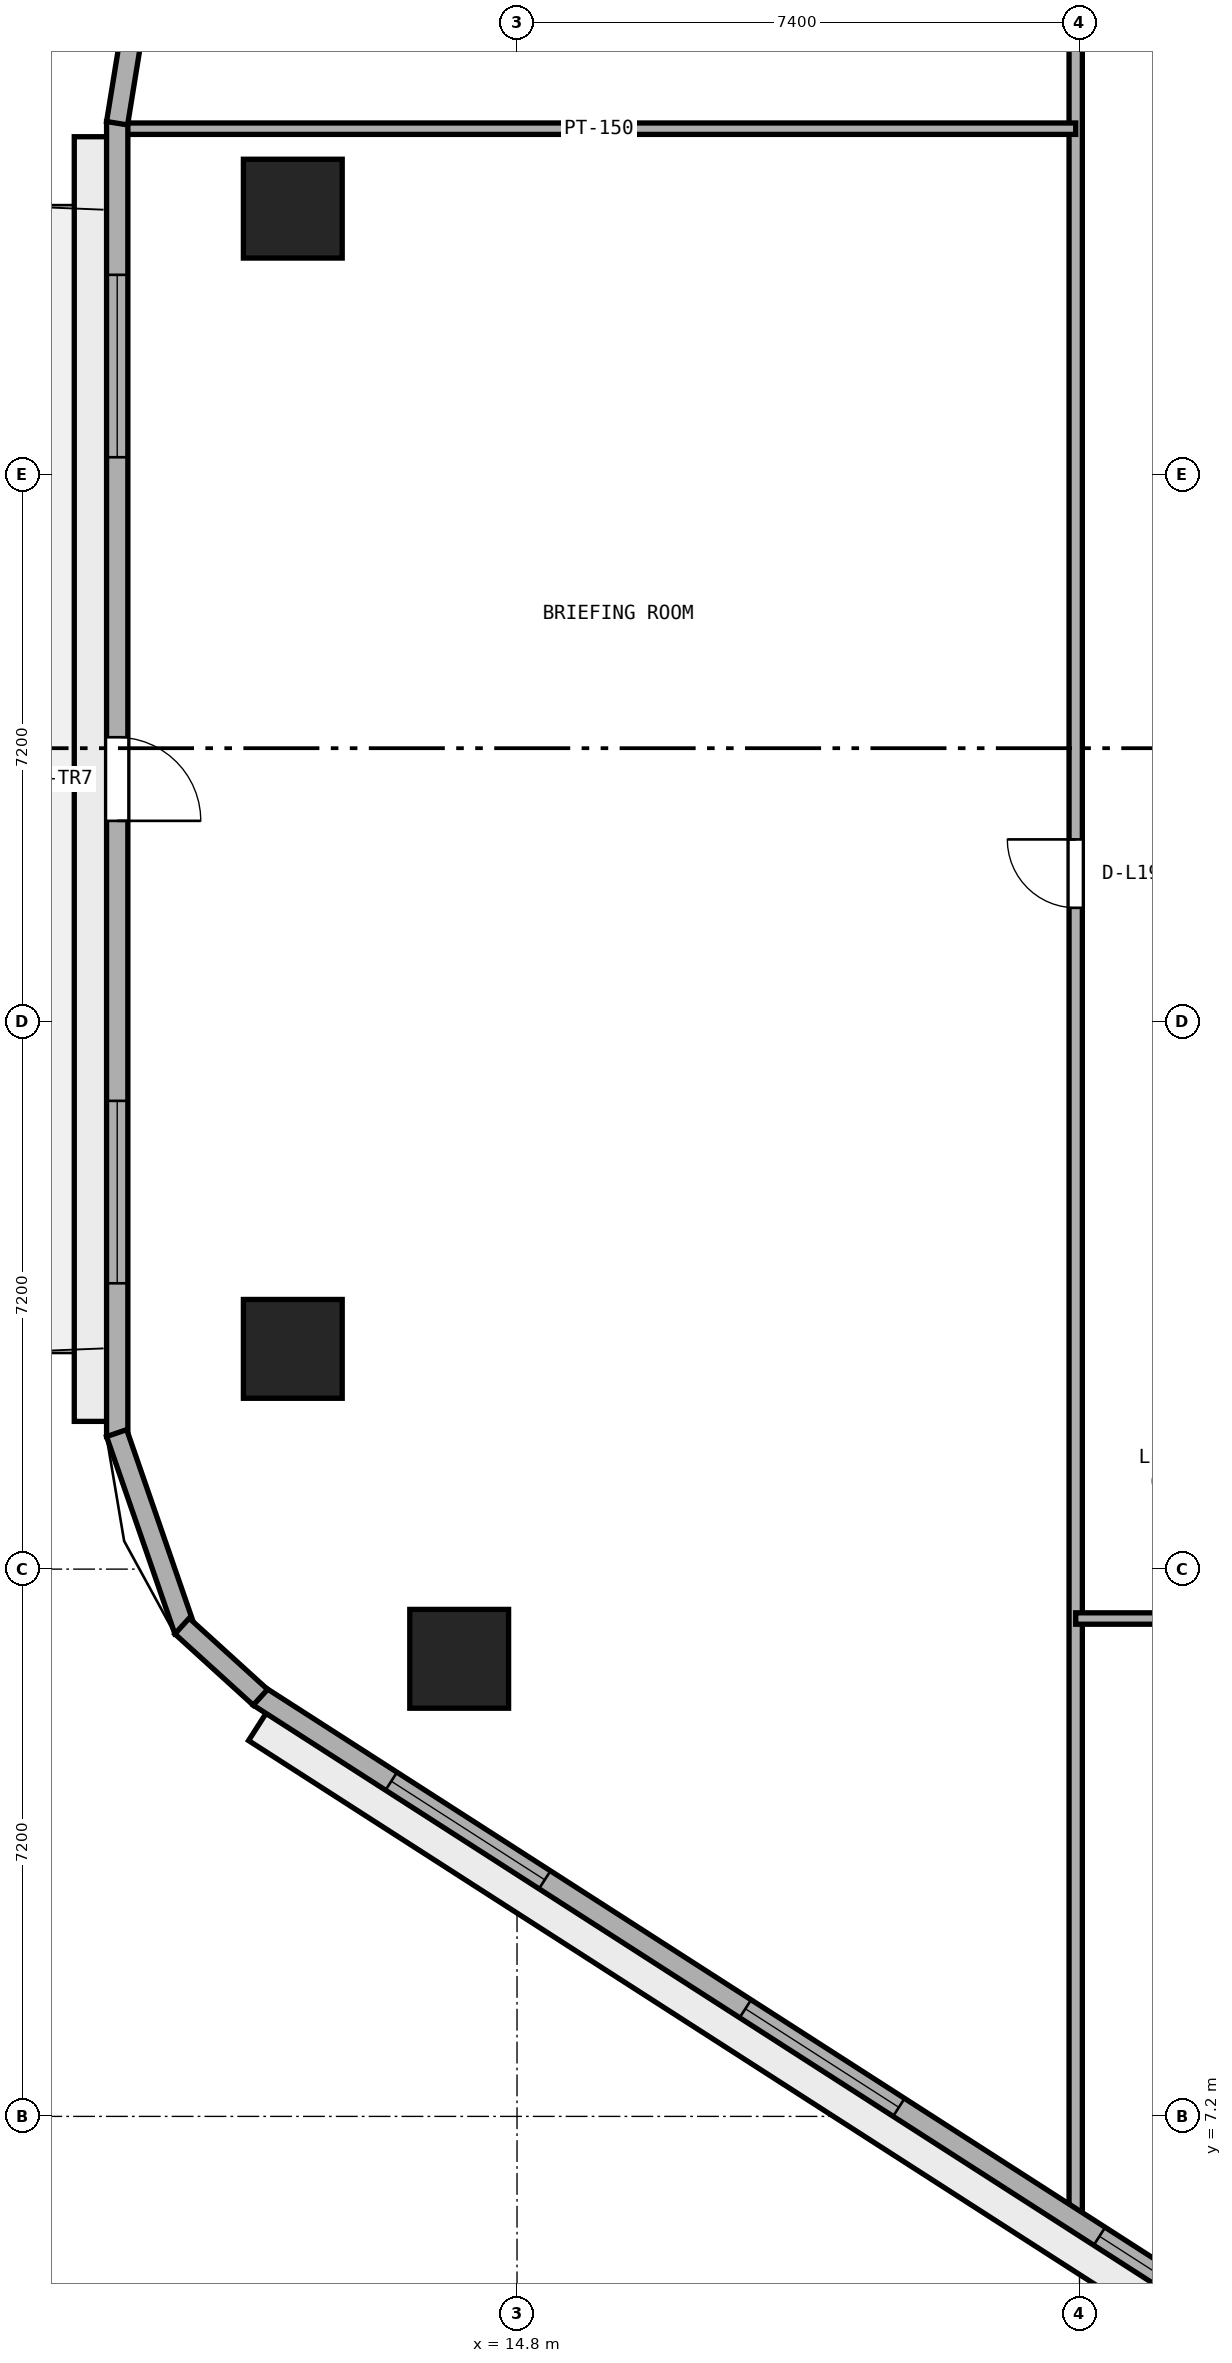
"""IFC4 building model, lengths in metres.
Left out: names, types, materials, properties, quantities, classifications, styles, units other than length and angle.
Written with IfcOpenShell. Run it as: python <this file> out.ifc"""

import sys

from ifc_helpers import new_model, si_unit, direction, frame, frame_2d, origin, origin_2d, place, context, subcontext, project, spatial, rectangle, extrude, element, fill, save


model = new_model("IFC4")
c1 = context("Model", 3, precision=1e-05, world=origin(), true_north=direction((0.0, 1.0)))
c2 = subcontext(c1, "Body", "Model", "MODEL_VIEW")
j1 = project(units=[si_unit("LENGTHUNIT", "METRE"), si_unit("PLANEANGLEUNIT", "RADIAN")], contexts=[c1])
p1 = place(None, origin())
s1 = spatial("IfcSite", under=j1, at=p1, CompositionType="ELEMENT")
p2 = place(p1, origin())
s2 = spatial("IfcBuilding", under=s1, at=p2, CompositionType="ELEMENT")
p3 = place(p2, frame((0.0, 0.0, 78.2)))
s3 = spatial("IfcBuildingStorey", under=s2, at=p3, CompositionType="ELEMENT", Elevation=78.2)
for number, where, z_axis, x_axis in (
    (1, (11.85, 32.298, 0.0), (0.0, 0.0, 1.0), (1.0, 0.0, 0.0)),
    (2, (11.85, 17.298, 0.0), (0.0, 0.0, 1.0), (1.0, 0.0, 0.0)),
    (3, (14.039, 13.22, 0.0), (0.0, 0.0, 1.0), (1.0, 0.0, 0.0)),
):
    element("IfcColumn", number, at=place(p3, frame(where, z_axis=z_axis, x_axis=x_axis)), inside=s3, PredefinedType="COLUMN", context=c2, shape_type="SweptSolid", body=[
        extrude(rectangle(XDim=1.3, YDim=1.3, at=origin_2d()), origin(), (0.0, 0.0, 1.0), 3.8),
    ])
p4 = place(p3, frame((22.15, 5.798, 0.0), z_axis=(0.0, 0.0, 1.0), x_axis=(0.0, 1.0, 0.0)))
e4 = element("IfcWall", 4, at=p4, inside=s3, PredefinedType="PARTITIONING", context=c2, shape_type="SweptSolid", body=[
    extrude(rectangle(XDim=30.852, YDim=0.175, at=frame_2d((15.426, 0.0))), origin(), (0.0, 0.0, 1.0), 3.525),
])
p5 = place(p4, frame((17.302, 0.0, 0.0)))
e5 = element("IfcOpeningElement", 5, at=p5, cuts=e4, PredefinedType="OPENING", context=c2, shape_type="SweptSolid", body=[
    extrude(rectangle(XDim=0.9, YDim=2.1, at=frame_2d((0.45, 1.05))), frame((0.0, 0.097, 0.0), z_axis=(0.0, -1.0, 0.0), x_axis=(1.0, 0.0, 0.0)), (0.0, 0.0, 1.0), 0.195),
])
p6 = place(p3, frame((22.15, 13.75, 0.0), z_axis=(0.0, 0.0, 1.0), x_axis=(1.0, 0.0, 0.0)))
e6 = element("IfcWall", 6, at=p6, inside=s3, PredefinedType="PARTITIONING", context=c2, shape_type="SweptSolid", body=[
    extrude(rectangle(XDim=29.7, YDim=0.15, at=frame_2d((14.85, 0.0))), origin(), (0.0, 0.0, 1.0), 3.525),
])
p7 = place(p6, frame((4.145, 0.0, 0.0)))
e7 = element("IfcOpeningElement", 7, at=p7, cuts=e6, PredefinedType="OPENING", context=c2, shape_type="SweptSolid", body=[
    extrude(rectangle(XDim=1.0, YDim=2.12, at=frame_2d((0.5, 1.06))), frame((0.0, 0.085, 0.0), z_axis=(0.0, -1.0, 0.0), x_axis=(1.0, 0.0, 0.0)), (0.0, 0.0, 1.0), 0.17),
])
p8 = place(p6, frame((18.755, 0.0, 0.0)))
e8 = element("IfcOpeningElement", 8, at=p8, cuts=e6, PredefinedType="OPENING", context=c2, shape_type="SweptSolid", body=[
    extrude(rectangle(XDim=1.0, YDim=2.12, at=frame_2d((0.5, 1.06))), frame((0.0, 0.085, 0.0), z_axis=(0.0, -1.0, 0.0), x_axis=(1.0, 0.0, 0.0)), (0.0, 0.0, 1.0), 0.17),
])
p9 = place(p3, frame((9.605, 33.35, 0.0), z_axis=(0.0, 0.0, 1.0), x_axis=(1.0, 0.0, 0.0)))
e9 = element("IfcWall", 9, at=p9, inside=s3, PredefinedType="PARTITIONING", context=c2, shape_type="SweptSolid", body=[
    extrude(rectangle(XDim=12.545, YDim=0.15, at=frame_2d((6.272, 0.0))), origin(), (0.0, 0.0, 1.0), 3.525),
])
p10 = place(p3, frame((9.54, 33.444, 0.0), z_axis=(0.0, 0.0, 1.0), x_axis=(0.0, -1.0, 0.0)))
e10 = element("IfcWall", 10, at=p10, inside=s3, PredefinedType="STANDARD", context=c2, shape_type="SweptSolid", body=[
    extrude(rectangle(XDim=17.301, YDim=0.28, at=frame_2d((8.65, 0.0))), origin(), (0.0, 0.0, 1.0), 3.525),
])
p11 = place(p10, frame((8.1, 0.0, 0.0)))
e11 = element("IfcOpeningElement", 11, at=p11, cuts=e10, PredefinedType="OPENING", context=c2, shape_type="SweptSolid", body=[
    extrude(rectangle(XDim=1.1, YDim=2.2, at=frame_2d((0.55, 1.1))), frame((0.0, 0.15, 0.0), z_axis=(0.0, -1.0, 0.0), x_axis=(1.0, 0.0, 0.0)), (0.0, 0.0, 1.0), 0.3),
])
p12 = place(p10, frame((2.017, 0.0, 0.9)))
e12 = element("IfcOpeningElement", 12, at=p12, cuts=e10, PredefinedType="OPENING", context=c2, shape_type="SweptSolid", body=[
    extrude(rectangle(XDim=2.4, YDim=1.75, at=frame_2d((1.2, 0.875))), frame((0.0, 0.15, 0.0), z_axis=(0.0, -1.0, 0.0), x_axis=(1.0, 0.0, 0.0)), (0.0, 0.0, 1.0), 0.3),
])
p13 = place(p10, frame((12.884, 0.0, 0.9)))
e13 = element("IfcOpeningElement", 13, at=p13, cuts=e10, PredefinedType="OPENING", context=c2, shape_type="SweptSolid", body=[
    extrude(rectangle(XDim=2.4, YDim=1.75, at=frame_2d((1.2, 0.875))), frame((0.0, 0.15, 0.0), z_axis=(0.0, -1.0, 0.0), x_axis=(1.0, 0.0, 0.0)), (0.0, 0.0, 1.0), 0.3),
])
p14 = place(p3, frame((11.405, 12.728, 0.0), z_axis=(0.0, 0.0, 1.0), x_axis=(0.841304564637, -0.540561402175, 0.0)))
e14 = element("IfcWall", 14, at=p14, inside=s3, PredefinedType="STANDARD", context=c2, shape_type="SweptSolid", body=[
    extrude(rectangle(XDim=17.612, YDim=0.28, at=frame_2d((8.806, 0.0))), origin(), (0.0, 0.0, 1.0), 3.525),
])
p15 = place(p14, frame((2.069, 0.0, 0.9)))
e15 = element("IfcOpeningElement", 15, at=p15, cuts=e14, PredefinedType="OPENING", context=c2, shape_type="SweptSolid", body=[
    extrude(rectangle(XDim=2.4, YDim=1.75, at=frame_2d((1.2, 0.875))), frame((0.0, 0.15, 0.0), z_axis=(0.0, -1.0, 0.0), x_axis=(1.0, 0.0, 0.0)), (0.0, 0.0, 1.0), 0.3),
])
p16 = place(p14, frame((7.606, 0.0, 0.9)))
e16 = element("IfcOpeningElement", 16, at=p16, cuts=e14, PredefinedType="OPENING", context=c2, shape_type="SweptSolid", body=[
    extrude(rectangle(XDim=2.4, YDim=1.75, at=frame_2d((1.2, 0.875))), frame((0.0, 0.15, 0.0), z_axis=(0.0, -1.0, 0.0), x_axis=(1.0, 0.0, 0.0)), (0.0, 0.0, 1.0), 0.3),
])
p17 = place(p14, frame((13.143, 0.0, 0.9)))
e17 = element("IfcOpeningElement", 17, at=p17, cuts=e14, PredefinedType="OPENING", context=c2, shape_type="SweptSolid", body=[
    extrude(rectangle(XDim=2.4, YDim=1.75, at=frame_2d((1.2, 0.875))), frame((0.0, 0.15, 0.0), z_axis=(0.0, -1.0, 0.0), x_axis=(1.0, 0.0, 0.0)), (0.0, 0.0, 1.0), 0.3),
])
p18 = place(p3, frame((9.753, 34.749, 0.0), z_axis=(0.0, 0.0, 1.0), x_axis=(-0.160037671962, -0.987110907423, 0.0)))
e18 = element("IfcWall", 18, at=p18, inside=s3, PredefinedType="STANDARD", context=c2, shape_type="SweptSolid", body=[
    extrude(rectangle(XDim=1.344, YDim=0.28, at=frame_2d((0.672, 0.0))), origin(), (0.0, 0.0, 1.0), 3.525),
])
p19 = place(p3, frame((9.532, 16.189, 0.0), z_axis=(0.0, 0.0, 1.0), x_axis=(0.32708309668, -0.944995580871, 0.0)))
e19 = element("IfcWall", 19, at=p19, inside=s3, PredefinedType="STANDARD", context=c2, shape_type="SweptSolid", body=[
    extrude(rectangle(XDim=2.748, YDim=0.28, at=frame_2d((1.374, 0.0))), origin(), (0.0, 0.0, 1.0), 3.525),
])
p20 = place(p3, frame((10.393, 13.651, 0.0), z_axis=(0.0, 0.0, 1.0), x_axis=(0.74003521851, -0.672568119498, 0.0)))
e20 = element("IfcWall", 20, at=p20, inside=s3, PredefinedType="STANDARD", context=c2, shape_type="SweptSolid", body=[
    extrude(rectangle(XDim=1.393, YDim=0.28, at=frame_2d((0.697, 0.0))), origin(), (0.0, 0.0, 1.0), 3.525),
])
p21 = place(p5, origin())
e21 = element("IfcDoor", 21, at=p21, inside=s3, OperationType="SINGLE_SWING_RIGHT", PredefinedType="DOOR", context=c2, shape_type="SweptSolid", body=[
    extrude(rectangle(XDim=0.9, YDim=2.1, at=frame_2d((0.45, 1.05))), frame((0.0, 0.025, 0.0), z_axis=(0.0, -1.0, 0.0), x_axis=(1.0, 0.0, 0.0)), (0.0, 0.0, 1.0), 0.05),
])
fill(e5, e21)
p22 = place(p11, origin())
e22 = element("IfcDoor", 22, at=p22, inside=s3, OperationType="SINGLE_SWING_RIGHT", PredefinedType="DOOR", context=c2, shape_type="SweptSolid", body=[
    extrude(rectangle(XDim=1.1, YDim=2.2, at=frame_2d((0.55, 1.1))), frame((0.0, 0.025, 0.0), z_axis=(0.0, -1.0, 0.0), x_axis=(1.0, 0.0, 0.0)), (0.0, 0.0, 1.0), 0.05),
])
fill(e11, e22)
p23 = place(p12, origin())
e23 = element("IfcWindow", 23, at=p23, inside=s3, PartitioningType="SINGLE_PANEL", PredefinedType="WINDOW", context=c2, shape_type="SweptSolid", body=[
    extrude(rectangle(XDim=2.4, YDim=1.75, at=frame_2d((1.2, 0.875))), frame((0.0, 0.03, 0.0), z_axis=(0.0, -1.0, 0.0), x_axis=(1.0, 0.0, 0.0)), (0.0, 0.0, 1.0), 0.06),
])
fill(e12, e23)
p24 = place(p13, origin())
e24 = element("IfcWindow", 24, at=p24, inside=s3, PartitioningType="SINGLE_PANEL", PredefinedType="WINDOW", context=c2, shape_type="SweptSolid", body=[
    extrude(rectangle(XDim=2.4, YDim=1.75, at=frame_2d((1.2, 0.875))), frame((0.0, 0.03, 0.0), z_axis=(0.0, -1.0, 0.0), x_axis=(1.0, 0.0, 0.0)), (0.0, 0.0, 1.0), 0.06),
])
fill(e13, e24)
p25 = place(p15, origin())
e25 = element("IfcWindow", 25, at=p25, inside=s3, PartitioningType="SINGLE_PANEL", PredefinedType="WINDOW", context=c2, shape_type="SweptSolid", body=[
    extrude(rectangle(XDim=2.4, YDim=1.75, at=frame_2d((1.2, 0.875))), frame((0.0, 0.03, 0.0), z_axis=(0.0, -1.0, 0.0), x_axis=(1.0, 0.0, 0.0)), (0.0, 0.0, 1.0), 0.06),
])
fill(e15, e25)
p26 = place(p16, origin())
e26 = element("IfcWindow", 26, at=p26, inside=s3, PartitioningType="SINGLE_PANEL", PredefinedType="WINDOW", context=c2, shape_type="SweptSolid", body=[
    extrude(rectangle(XDim=2.4, YDim=1.75, at=frame_2d((1.2, 0.875))), frame((0.0, 0.03, 0.0), z_axis=(0.0, -1.0, 0.0), x_axis=(1.0, 0.0, 0.0)), (0.0, 0.0, 1.0), 0.06),
])
fill(e16, e26)
p27 = place(p17, origin())
e27 = element("IfcWindow", 27, at=p27, inside=s3, PartitioningType="SINGLE_PANEL", PredefinedType="WINDOW", context=c2, shape_type="SweptSolid", body=[
    extrude(rectangle(XDim=2.4, YDim=1.75, at=frame_2d((1.2, 0.875))), frame((0.0, 0.03, 0.0), z_axis=(0.0, -1.0, 0.0), x_axis=(1.0, 0.0, 0.0)), (0.0, 0.0, 1.0), 0.06),
])
fill(e17, e27)
save(model, sys.argv[1])
